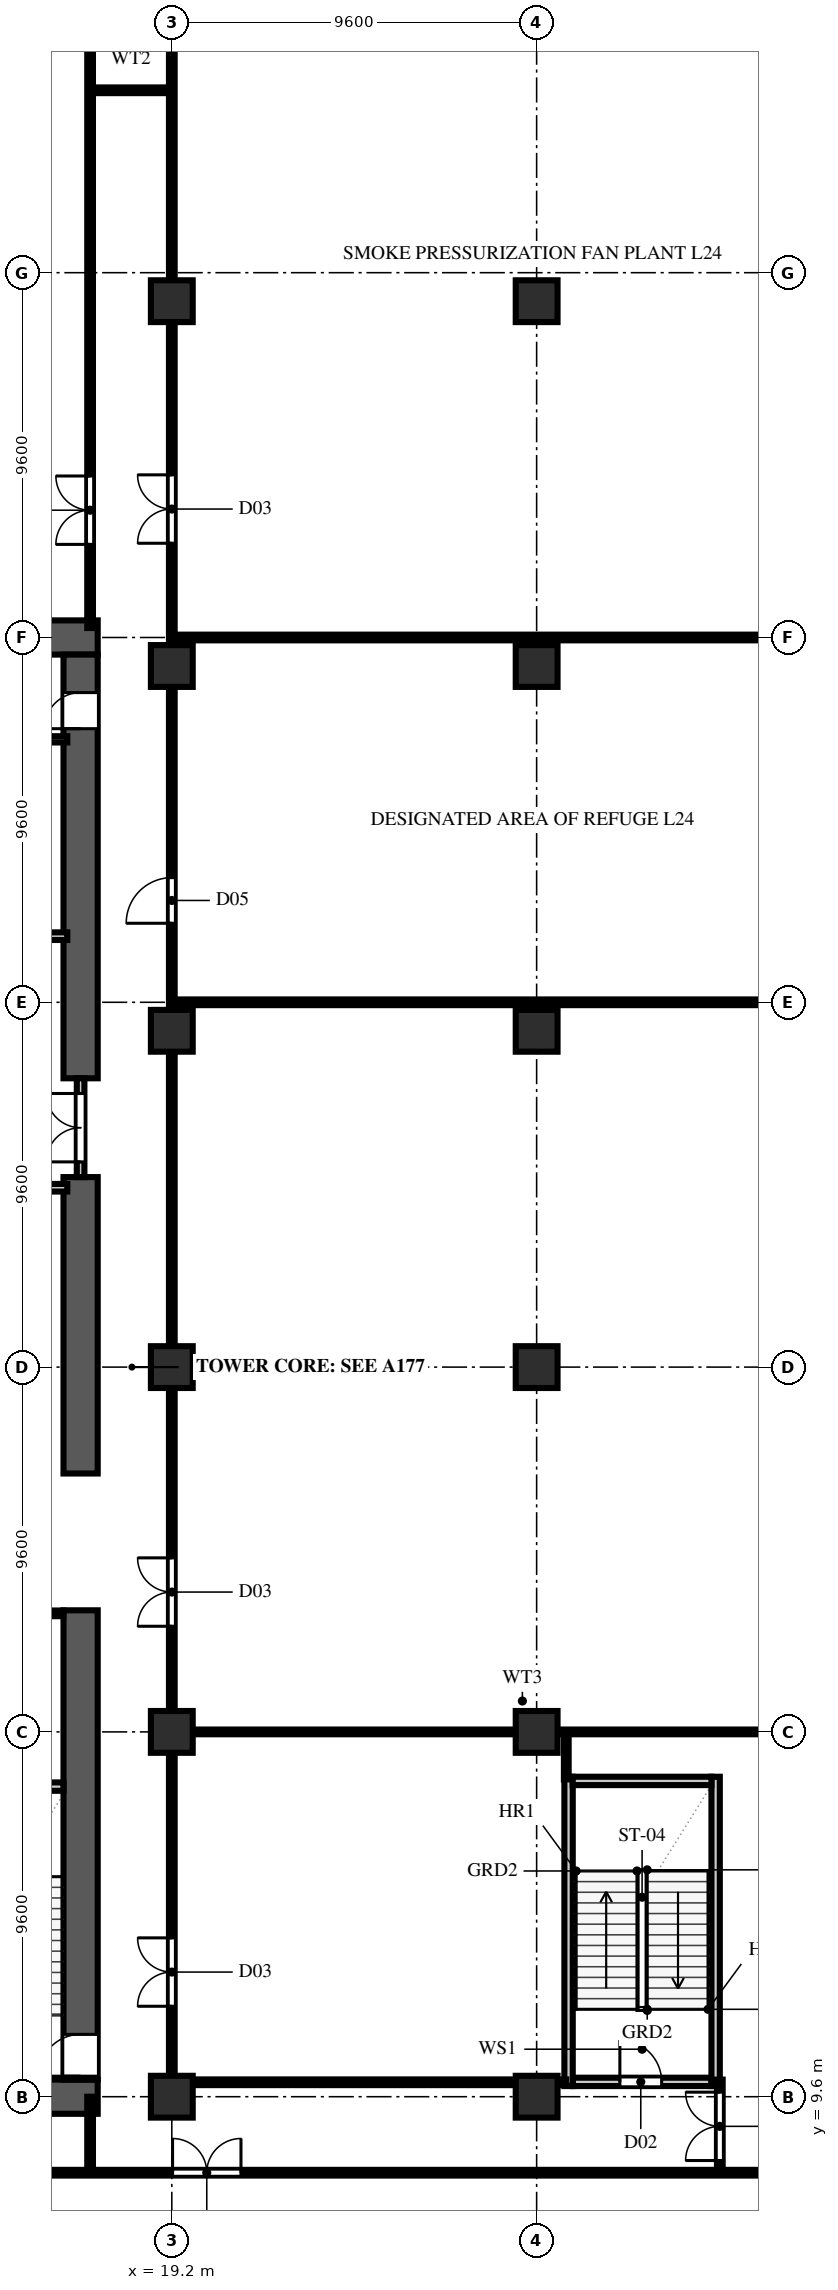
"""IFC4 building model, lengths in metres.
Left out: names, types, materials, properties, quantities, classifications, styles, units other than length and angle.
Written with IfcOpenShell. Run it as: python <this file> out.ifc"""

import sys

from ifc_helpers import new_model, si_unit, direction, frame, frame_2d, origin, origin_2d, place, context, subcontext, project, spatial, rectangle, extrude, element, fill, save


model = new_model("IFC4")
c1 = context("Model", 3, precision=1e-05, world=origin(), true_north=direction((0.0, 1.0)))
c2 = subcontext(c1, "Body", "Model", "MODEL_VIEW")
j1 = project(units=[si_unit("LENGTHUNIT", "METRE"), si_unit("PLANEANGLEUNIT", "RADIAN")], contexts=[c1])
p1 = place(None, origin())
s1 = spatial("IfcSite", under=j1, at=p1, CompositionType="ELEMENT")
p2 = place(p1, origin())
s2 = spatial("IfcBuilding", under=s1, at=p2, CompositionType="ELEMENT")
p3 = place(p2, frame((0.0, 0.0, 96.4)))
s3 = spatial("IfcBuildingStorey", under=s2, at=p3, CompositionType="ELEMENT", Elevation=96.4)
for number, where, z_axis, x_axis in (
    (1, (2.65, 9.6, 0.0), (0.0, 0.0, 1.0), (1.0, 0.0, 0.0)),
    (2, (2.65, 48.0, 0.0), (0.0, 0.0, 1.0), (1.0, 0.0, 0.0)),
):
    element("IfcWall", number, at=place(p3, frame(where, z_axis=z_axis, x_axis=x_axis)), inside=s3, PredefinedType="SHEAR", context=c2, shape_type="SweptSolid", body=[
        extrude(rectangle(XDim=14.6, YDim=0.9, at=frame_2d((7.3, 0.0))), origin(), (0.0, 0.0, 1.0), 4.74),
    ])
p4 = place(p3, frame((16.8, 10.05, 0.0), z_axis=(0.0, 0.0, 1.0), x_axis=(0.0, 1.0, 0.0)))
e3 = element("IfcWall", 3, at=p4, inside=s3, PredefinedType="SHEAR", context=c2, shape_type="SweptSolid", body=[
    extrude(rectangle(XDim=12.35, YDim=0.9, at=frame_2d((6.175, 0.0))), origin(), (0.0, 0.0, 1.0), 4.74),
])
p5 = place(p4, frame((0.09, 0.0, 0.0)))
e4 = element("IfcOpeningElement", 4, at=p5, cuts=e3, PredefinedType="OPENING", context=c2, shape_type="SweptSolid", body=[
    extrude(rectangle(XDim=1.1, YDim=2.2, at=frame_2d((0.55, 1.1))), frame((0.0, 0.462, 0.0), z_axis=(0.0, -1.0, 0.0), x_axis=(1.0, 0.0, 0.0)), (0.0, 0.0, 1.0), 0.924),
])
p6 = place(p3, frame((16.8, 26.0, 0.0), z_axis=(0.0, 0.0, 1.0), x_axis=(0.0, 1.0, 0.0)))
e5 = element("IfcWall", 5, at=p6, inside=s3, PredefinedType="SHEAR", context=c2, shape_type="SweptSolid", body=[
    extrude(rectangle(XDim=7.8, YDim=0.9, at=frame_2d((3.9, 0.0))), origin(), (0.0, 0.0, 1.0), 4.74),
])
p7 = place(p3, frame((16.8, 36.4, 0.0), z_axis=(0.0, 0.0, 1.0), x_axis=(0.0, 1.0, 0.0)))
e6 = element("IfcWall", 6, at=p7, inside=s3, PredefinedType="SHEAR", context=c2, shape_type="SweptSolid", body=[
    extrude(rectangle(XDim=11.15, YDim=0.9, at=frame_2d((5.575, 0.0))), origin(), (0.0, 0.0, 1.0), 4.74),
])
p8 = place(p7, frame((9.2, 0.0, 0.0)))
e7 = element("IfcOpeningElement", 7, at=p8, cuts=e6, PredefinedType="OPENING", context=c2, shape_type="SweptSolid", body=[
    extrude(rectangle(XDim=0.95, YDim=2.15, at=frame_2d((0.475, 1.075))), frame((0.0, 0.462, 0.0), z_axis=(0.0, -1.0, 0.0), x_axis=(1.0, 0.0, 0.0)), (0.0, 0.0, 1.0), 0.924),
])
for number, where, z_axis, x_axis in (
    (8, (19.2, 9.6, 0.0), (0.0, 0.0, 1.0), (1.0, 0.0, 0.0)),
    (9, (19.2, 19.2, 0.0), (0.0, 0.0, 1.0), (1.0, 0.0, 0.0)),
    (10, (19.2, 28.8, 0.0), (0.0, 0.0, 1.0), (1.0, 0.0, 0.0)),
    (11, (19.2, 37.65, 0.0), (0.0, 0.0, 1.0), (1.0, 0.0, 0.0)),
    (12, (19.2, 47.25, 0.0), (0.0, 0.0, 1.0), (1.0, 0.0, 0.0)),
    (13, (19.2, 56.85, 0.0), (0.0, 0.0, 1.0), (1.0, 0.0, 0.0)),
    (14, (28.8, 9.6, 0.0), (0.0, 0.0, 1.0), (1.0, 0.0, 0.0)),
    (15, (28.8, 19.2, 0.0), (0.0, 0.0, 1.0), (1.0, 0.0, 0.0)),
    (16, (28.8, 28.8, 0.0), (0.0, 0.0, 1.0), (1.0, 0.0, 0.0)),
    (17, (28.8, 37.65, 0.0), (0.0, 0.0, 1.0), (1.0, 0.0, 0.0)),
    (18, (28.8, 47.25, 0.0), (0.0, 0.0, 1.0), (1.0, 0.0, 0.0)),
    (19, (28.8, 56.85, 0.0), (0.0, 0.0, 1.0), (1.0, 0.0, 0.0)),
):
    element("IfcColumn", number, at=place(p3, frame(where, z_axis=z_axis, x_axis=x_axis)), inside=s3, PredefinedType="COLUMN", context=c2, shape_type="SweptSolid", body=[
        extrude(rectangle(XDim=1.1, YDim=1.1, at=origin_2d()), origin(), (0.0, 0.0, 1.0), 5.0),
    ])
p9 = place(p3, frame((12.75, 17.76, 0.0), z_axis=(0.0, 0.0, 1.0), x_axis=(1.0, 0.0, 0.0)))
e20 = element("IfcWall", 20, at=p9, inside=s3, PredefinedType="SOLIDWALL", context=c2, shape_type="SweptSolid", body=[
    extrude(rectangle(XDim=3.6, YDim=0.22, at=frame_2d((1.8, 0.0))), origin(), (0.0, 0.0, 1.0), 4.74),
])
p10 = place(p3, frame((29.75, 9.99, 0.0), z_axis=(0.0, 0.0, 1.0), x_axis=(1.0, 0.0, 0.0)))
e21 = element("IfcWall", 21, at=p10, inside=s3, PredefinedType="SOLIDWALL", context=c2, shape_type="SweptSolid", body=[
    extrude(rectangle(XDim=3.65, YDim=0.22, at=frame_2d((1.825, 0.0))), origin(), (0.0, 0.0, 1.0), 4.74),
])
p11 = place(p10, frame((1.24, 0.0, 0.0)))
e22 = element("IfcOpeningElement", 22, at=p11, cuts=e21, PredefinedType="OPENING", context=c2, shape_type="SweptSolid", body=[
    extrude(rectangle(XDim=1.1, YDim=2.2, at=frame_2d((0.55, 1.1))), frame((0.0, 0.122, 0.0), z_axis=(0.0, -1.0, 0.0), x_axis=(1.0, 0.0, 0.0)), (0.0, 0.0, 1.0), 0.244),
])
for number, where, z_axis, x_axis in (
    (23, (29.64, 9.88, 0.0), (0.0, 0.0, 1.0), (0.0, 1.0, 0.0)),
    (24, (33.51, 9.88, 0.0), (0.0, 0.0, 1.0), (0.0, 1.0, 0.0)),
):
    element("IfcWall", number, at=place(p3, frame(where, z_axis=z_axis, x_axis=x_axis)), inside=s3, PredefinedType="SOLIDWALL", context=c2, shape_type="SweptSolid", body=[
        extrude(rectangle(XDim=8.14, YDim=0.22, at=frame_2d((4.07, 0.0))), origin(), (0.0, 0.0, 1.0), 4.74),
    ])
p12 = place(p3, frame((29.75, 17.91, 0.0), z_axis=(0.0, 0.0, 1.0), x_axis=(1.0, 0.0, 0.0)))
e25 = element("IfcWall", 25, at=p12, inside=s3, PredefinedType="SOLIDWALL", context=c2, shape_type="SweptSolid", body=[
    extrude(rectangle(XDim=3.65, YDim=0.22, at=frame_2d((1.825, 0.0))), origin(), (0.0, 0.0, 1.0), 4.74),
])
p13 = place(p3, frame((13.12, 33.52, 0.0), z_axis=(0.0, 0.0, 1.0), x_axis=(1.0, 0.0, 0.0)))
e26 = element("IfcWall", 26, at=p13, inside=s3, PredefinedType="SOLIDWALL", context=c2, shape_type="SweptSolid", body=[
    extrude(rectangle(XDim=3.33, YDim=0.2, at=frame_2d((1.665, 0.0))), origin(), (0.0, 0.0, 1.0), 4.74),
])
p14 = place(p3, frame((6.32, 40.14, 0.0), z_axis=(0.0, 0.0, 1.0), x_axis=(1.0, 0.0, 0.0)))
e27 = element("IfcWall", 27, at=p14, inside=s3, PredefinedType="SOLIDWALL", context=c2, shape_type="SweptSolid", body=[
    extrude(rectangle(XDim=10.13, YDim=0.2, at=frame_2d((5.065, 0.0))), origin(), (0.0, 0.0, 1.0), 4.74),
])
p15 = place(p3, frame((16.8, 33.8, 0.0), z_axis=(0.0, 0.0, 1.0), x_axis=(0.0, 1.0, 0.0)))
e28 = element("IfcWall", 28, at=p15, inside=s3, PredefinedType="SOLIDWALL", context=c2, shape_type="SweptSolid", body=[
    extrude(rectangle(XDim=2.6, YDim=0.2, at=frame_2d((1.3, 0.0))), origin(), (0.0, 0.0, 1.0), 4.74),
])
p16 = place(p15, frame((0.4, 0.0, 0.0)))
e29 = element("IfcOpeningElement", 29, at=p16, cuts=e28, PredefinedType="OPENING", context=c2, shape_type="SweptSolid", body=[
    extrude(rectangle(XDim=1.8, YDim=2.2, at=frame_2d((0.9, 1.1))), frame((0.0, 0.112, 0.0), z_axis=(0.0, -1.0, 0.0), x_axis=(1.0, 0.0, 0.0)), (0.0, 0.0, 1.0), 0.224),
])
p17 = place(p3, frame((13.225, 22.32, 0.0), z_axis=(0.0, 0.0, 1.0), x_axis=(1.0, 0.0, 0.0)))
e30 = element("IfcWall", 30, at=p17, inside=s3, PredefinedType="PARTITIONING", context=c2, shape_type="SweptSolid", body=[
    extrude(rectangle(XDim=3.12, YDim=0.15, at=frame_2d((1.56, 0.0))), origin(), (0.0, 0.0, 1.0), 4.74),
])
p18 = place(p17, frame((1.0, 0.0, 0.0)))
e31 = element("IfcOpeningElement", 31, at=p18, cuts=e30, PredefinedType="OPENING", context=c2, shape_type="SweptSolid", body=[
    extrude(rectangle(XDim=0.85, YDim=2.1, at=frame_2d((0.425, 1.05))), frame((0.0, 0.087, 0.0), z_axis=(0.0, -1.0, 0.0), x_axis=(1.0, 0.0, 0.0)), (0.0, 0.0, 1.0), 0.174),
])
p19 = place(p3, frame((6.32, 45.32, 0.0), z_axis=(0.0, 0.0, 1.0), x_axis=(1.0, 0.0, 0.0)))
e32 = element("IfcWall", 32, at=p19, inside=s3, PredefinedType="PLUMBINGWALL", context=c2, shape_type="SweptSolid", body=[
    extrude(rectangle(XDim=10.13, YDim=0.165, at=frame_2d((5.065, 0.0))), origin(), (0.0, 0.0, 1.0), 4.74),
])
p20 = place(p19, frame((0.9, 0.0, 0.0)))
e33 = element("IfcOpeningElement", 33, at=p20, cuts=e32, PredefinedType="OPENING", context=c2, shape_type="SweptSolid", body=[
    extrude(rectangle(XDim=0.92, YDim=2.15, at=frame_2d((0.46, 1.075))), frame((0.0, 0.094, 0.0), z_axis=(0.0, -1.0, 0.0), x_axis=(1.0, 0.0, 0.0)), (0.0, 0.0, 1.0), 0.189),
])
p21 = place(p19, frame((4.6, 0.0, 0.0)))
e34 = element("IfcOpeningElement", 34, at=p21, cuts=e32, PredefinedType="OPENING", context=c2, shape_type="SweptSolid", body=[
    extrude(rectangle(XDim=0.92, YDim=2.15, at=frame_2d((0.46, 1.075))), frame((0.0, 0.094, 0.0), z_axis=(0.0, -1.0, 0.0), x_axis=(1.0, 0.0, 0.0)), (0.0, 0.0, 1.0), 0.189),
])
p22 = place(p19, frame((8.1, 0.0, 0.0)))
e35 = element("IfcOpeningElement", 35, at=p22, cuts=e32, PredefinedType="OPENING", context=c2, shape_type="SweptSolid", body=[
    extrude(rectangle(XDim=0.92, YDim=2.15, at=frame_2d((0.46, 1.075))), frame((0.0, 0.094, 0.0), z_axis=(0.0, -1.0, 0.0), x_axis=(1.0, 0.0, 0.0)), (0.0, 0.0, 1.0), 0.189),
])
p23 = place(p3, frame((17.05, 7.6, 0.0), z_axis=(0.0, 0.0, 1.0), x_axis=(0.0, 1.0, 0.0)))
e36 = element("IfcWall", 36, at=p23, inside=s3, PredefinedType="PARTITIONING", context=c2, shape_type="SweptSolid", body=[
    extrude(rectangle(XDim=2.0, YDim=0.15, at=frame_2d((1.0, 0.0))), origin(), (0.0, 0.0, 1.0), 4.74),
])
p24 = place(p3, frame((17.05, 62.4, 0.0), z_axis=(0.0, 0.0, 1.0), x_axis=(1.0, 0.0, 0.0)))
e37 = element("IfcWall", 37, at=p24, inside=s3, PredefinedType="PARTITIONING", context=c2, shape_type="SweptSolid", body=[
    extrude(rectangle(XDim=2.15, YDim=0.15, at=frame_2d((1.075, 0.0))), origin(), (0.0, 0.0, 1.0), 4.74),
])
p25 = place(p3, frame((0.22, 7.6, 0.0), z_axis=(0.0, 0.0, 1.0), x_axis=(1.0, 0.0, 0.0)))
e38 = element("IfcWall", 38, at=p25, inside=s3, PredefinedType="PARTITIONING", context=c2, shape_type="SweptSolid", body=[
    extrude(rectangle(XDim=66.76, YDim=0.15, at=frame_2d((33.38, 0.0))), origin(), (0.0, 0.0, 1.0), 4.74),
])
p26 = place(p25, frame((19.0, 0.0, 0.0)))
e39 = element("IfcOpeningElement", 39, at=p26, cuts=e38, PredefinedType="OPENING", context=c2, shape_type="SweptSolid", body=[
    extrude(rectangle(XDim=1.8, YDim=2.2, at=frame_2d((0.9, 1.1))), frame((0.0, 0.087, 0.0), z_axis=(0.0, -1.0, 0.0), x_axis=(1.0, 0.0, 0.0)), (0.0, 0.0, 1.0), 0.174),
])
p27 = place(p3, frame((33.62, 7.6, 0.0), z_axis=(0.0, 0.0, 1.0), x_axis=(0.0, 1.0, 0.0)))
e40 = element("IfcWall", 40, at=p27, inside=s3, PredefinedType="PARTITIONING", context=c2, shape_type="SweptSolid", body=[
    extrude(rectangle(XDim=2.45, YDim=0.15, at=frame_2d((1.225, 0.0))), origin(), (0.0, 0.0, 1.0), 4.74),
])
p28 = place(p27, frame((0.32, 0.0, 0.0)))
e41 = element("IfcOpeningElement", 41, at=p28, cuts=e40, PredefinedType="OPENING", context=c2, shape_type="SweptSolid", body=[
    extrude(rectangle(XDim=1.8, YDim=2.2, at=frame_2d((0.9, 1.1))), frame((0.0, 0.087, 0.0), z_axis=(0.0, -1.0, 0.0), x_axis=(1.0, 0.0, 0.0)), (0.0, 0.0, 1.0), 0.174),
])
p29 = place(p3, frame((19.2, 9.98, 0.0), z_axis=(0.0, 0.0, 1.0), x_axis=(1.0, 0.0, 0.0)))
e42 = element("IfcWall", 42, at=p29, inside=s3, PredefinedType="PARTITIONING", context=c2, shape_type="SweptSolid", body=[
    extrude(rectangle(XDim=10.38, YDim=0.15, at=frame_2d((5.19, 0.0))), origin(), (0.0, 0.0, 1.0), 4.74),
])
p30 = place(p3, frame((29.58, 17.95, 0.0), z_axis=(0.0, 0.0, 1.0), x_axis=(0.0, 1.0, 0.0)))
e43 = element("IfcWall", 43, at=p30, inside=s3, PredefinedType="PARTITIONING", context=c2, shape_type="SweptSolid", body=[
    extrude(rectangle(XDim=1.25, YDim=0.125, at=frame_2d((0.625, 0.0))), origin(), (0.0, 0.0, 1.0), 4.74),
])
p31 = place(p3, frame((19.2, 19.2, 0.0), z_axis=(0.0, 0.0, 1.0), x_axis=(1.0, 0.0, 0.0)))
e44 = element("IfcWall", 44, at=p31, inside=s3, PredefinedType="PARTITIONING", context=c2, shape_type="SweptSolid", body=[
    extrude(rectangle(XDim=18.45, YDim=0.125, at=frame_2d((9.225, 0.0))), origin(), (0.0, 0.0, 1.0), 2.323),
])
for number, where, z_axis, x_axis in (
    (45, (19.2, 38.4, 0.0), (0.0, 0.0, 1.0), (1.0, 0.0, 0.0)),
    (46, (19.2, 48.0, 0.0), (0.0, 0.0, 1.0), (1.0, 0.0, 0.0)),
):
    element("IfcWall", number, at=place(p3, frame(where, z_axis=z_axis, x_axis=x_axis)), inside=s3, PredefinedType="PARTITIONING", context=c2, shape_type="SweptSolid", body=[
        extrude(rectangle(XDim=18.98, YDim=0.15, at=frame_2d((9.49, 0.0))), origin(), (0.0, 0.0, 1.0), 4.74),
    ])
p32 = place(p3, frame((19.2, 9.98, 0.0), z_axis=(0.0, 0.0, 1.0), x_axis=(0.0, 1.0, 0.0)))
e47 = element("IfcWall", 47, at=p32, inside=s3, PredefinedType="PARTITIONING", context=c2, shape_type="SweptSolid", body=[
    extrude(rectangle(XDim=56.47, YDim=0.15, at=frame_2d((28.235, 0.0))), origin(), (0.0, 0.0, 1.0), 3.967),
])
p33 = place(p32, frame((2.0, 0.0, 0.0)))
e48 = element("IfcOpeningElement", 48, at=p33, cuts=e47, PredefinedType="OPENING", context=c2, shape_type="SweptSolid", body=[
    extrude(rectangle(XDim=1.8, YDim=2.2, at=frame_2d((0.9, 1.1))), frame((0.0, 0.087, 0.0), z_axis=(0.0, -1.0, 0.0), x_axis=(1.0, 0.0, 0.0)), (0.0, 0.0, 1.0), 0.174),
])
p34 = place(p32, frame((12.0, 0.0, 0.0)))
e49 = element("IfcOpeningElement", 49, at=p34, cuts=e47, PredefinedType="OPENING", context=c2, shape_type="SweptSolid", body=[
    extrude(rectangle(XDim=1.8, YDim=2.2, at=frame_2d((0.9, 1.1))), frame((0.0, 0.087, 0.0), z_axis=(0.0, -1.0, 0.0), x_axis=(1.0, 0.0, 0.0)), (0.0, 0.0, 1.0), 0.174),
])
p35 = place(p32, frame((30.5, 0.0, 0.0)))
e50 = element("IfcOpeningElement", 50, at=p35, cuts=e47, PredefinedType="OPENING", context=c2, shape_type="SweptSolid", body=[
    extrude(rectangle(XDim=1.2, YDim=2.2, at=frame_2d((0.6, 1.1))), frame((0.0, 0.087, 0.0), z_axis=(0.0, -1.0, 0.0), x_axis=(1.0, 0.0, 0.0)), (0.0, 0.0, 1.0), 0.174),
])
p36 = place(p32, frame((40.5, 0.0, 0.0)))
e51 = element("IfcOpeningElement", 51, at=p36, cuts=e47, PredefinedType="OPENING", context=c2, shape_type="SweptSolid", body=[
    extrude(rectangle(XDim=1.8, YDim=2.2, at=frame_2d((0.9, 1.1))), frame((0.0, 0.087, 0.0), z_axis=(0.0, -1.0, 0.0), x_axis=(1.0, 0.0, 0.0)), (0.0, 0.0, 1.0), 0.174),
])
p37 = place(p3, frame((17.05, 48.25, 0.0), z_axis=(0.0, 0.0, 1.0), x_axis=(0.0, 1.0, 0.0)))
e52 = element("IfcWall", 52, at=p37, inside=s3, PredefinedType="PARTITIONING", context=c2, shape_type="SweptSolid", body=[
    extrude(rectangle(XDim=18.73, YDim=0.15, at=frame_2d((9.365, 0.0))), origin(), (0.0, 0.0, 1.0), 4.74),
])
p38 = place(p37, frame((2.2, 0.0, 0.0)))
e53 = element("IfcOpeningElement", 53, at=p38, cuts=e52, PredefinedType="OPENING", context=c2, shape_type="SweptSolid", body=[
    extrude(rectangle(XDim=1.8, YDim=2.2, at=frame_2d((0.9, 1.1))), frame((0.0, 0.087, 0.0), z_axis=(0.0, -1.0, 0.0), x_axis=(1.0, 0.0, 0.0)), (0.0, 0.0, 1.0), 0.174),
])
p39 = place(p5, origin())
e54 = element("IfcDoor", 54, at=p39, inside=s3, OperationType="SINGLE_SWING_LEFT", PredefinedType="DOOR", context=c2, shape_type="SweptSolid", body=[
    extrude(rectangle(XDim=1.1, YDim=2.2, at=frame_2d((0.55, 1.1))), frame((0.0, 0.025, 0.0), z_axis=(0.0, -1.0, 0.0), x_axis=(1.0, 0.0, 0.0)), (0.0, 0.0, 1.0), 0.05),
])
fill(e4, e54)
p40 = place(p11, origin())
e55 = element("IfcDoor", 55, at=p40, inside=s3, OperationType="SINGLE_SWING_LEFT", PredefinedType="DOOR", context=c2, shape_type="SweptSolid", body=[
    extrude(rectangle(XDim=1.1, YDim=2.2, at=frame_2d((0.55, 1.1))), frame((0.0, 0.025, 0.0), z_axis=(0.0, -1.0, 0.0), x_axis=(1.0, 0.0, 0.0)), (0.0, 0.0, 1.0), 0.05),
])
fill(e22, e55)
p41 = place(p8, origin())
e56 = element("IfcDoor", 56, at=p41, inside=s3, OperationType="SINGLE_SWING_LEFT", PredefinedType="DOOR", context=c2, shape_type="SweptSolid", body=[
    extrude(rectangle(XDim=0.95, YDim=2.15, at=frame_2d((0.475, 1.075))), frame((0.0, 0.025, 0.0), z_axis=(0.0, -1.0, 0.0), x_axis=(1.0, 0.0, 0.0)), (0.0, 0.0, 1.0), 0.05),
])
fill(e7, e56)
p42 = place(p16, origin())
e57 = element("IfcDoor", 57, at=p42, inside=s3, OperationType="DOUBLE_DOOR_SINGLE_SWING", PredefinedType="DOOR", context=c2, shape_type="SweptSolid", body=[
    extrude(rectangle(XDim=1.8, YDim=2.2, at=frame_2d((0.9, 1.1))), frame((0.0, 0.025, 0.0), z_axis=(0.0, -1.0, 0.0), x_axis=(1.0, 0.0, 0.0)), (0.0, 0.0, 1.0), 0.05),
])
fill(e29, e57)
p43 = place(p26, origin())
e58 = element("IfcDoor", 58, at=p43, inside=s3, OperationType="DOUBLE_DOOR_SINGLE_SWING", PredefinedType="DOOR", context=c2, shape_type="SweptSolid", body=[
    extrude(rectangle(XDim=1.8, YDim=2.2, at=frame_2d((0.9, 1.1))), frame((0.0, 0.025, 0.0), z_axis=(0.0, -1.0, 0.0), x_axis=(1.0, 0.0, 0.0)), (0.0, 0.0, 1.0), 0.05),
])
fill(e39, e58)
p44 = place(p28, origin())
e59 = element("IfcDoor", 59, at=p44, inside=s3, OperationType="DOUBLE_DOOR_SINGLE_SWING", PredefinedType="DOOR", context=c2, shape_type="SweptSolid", body=[
    extrude(rectangle(XDim=1.8, YDim=2.2, at=frame_2d((0.9, 1.1))), frame((0.0, 0.025, 0.0), z_axis=(0.0, -1.0, 0.0), x_axis=(1.0, 0.0, 0.0)), (0.0, 0.0, 1.0), 0.05),
])
fill(e41, e59)
p45 = place(p33, origin())
e60 = element("IfcDoor", 60, at=p45, inside=s3, OperationType="DOUBLE_DOOR_SINGLE_SWING", PredefinedType="DOOR", context=c2, shape_type="SweptSolid", body=[
    extrude(rectangle(XDim=1.8, YDim=2.2, at=frame_2d((0.9, 1.1))), frame((0.0, 0.025, 0.0), z_axis=(0.0, -1.0, 0.0), x_axis=(1.0, 0.0, 0.0)), (0.0, 0.0, 1.0), 0.05),
])
fill(e48, e60)
p46 = place(p34, origin())
e61 = element("IfcDoor", 61, at=p46, inside=s3, OperationType="DOUBLE_DOOR_SINGLE_SWING", PredefinedType="DOOR", context=c2, shape_type="SweptSolid", body=[
    extrude(rectangle(XDim=1.8, YDim=2.2, at=frame_2d((0.9, 1.1))), frame((0.0, 0.025, 0.0), z_axis=(0.0, -1.0, 0.0), x_axis=(1.0, 0.0, 0.0)), (0.0, 0.0, 1.0), 0.05),
])
fill(e49, e61)
p47 = place(p35, origin())
e62 = element("IfcDoor", 62, at=p47, inside=s3, OperationType="SINGLE_SWING_LEFT", PredefinedType="DOOR", context=c2, shape_type="SweptSolid", body=[
    extrude(rectangle(XDim=1.2, YDim=2.2, at=frame_2d((0.6, 1.1))), frame((0.0, 0.025, 0.0), z_axis=(0.0, -1.0, 0.0), x_axis=(1.0, 0.0, 0.0)), (0.0, 0.0, 1.0), 0.05),
])
fill(e50, e62)
p48 = place(p36, origin())
e63 = element("IfcDoor", 63, at=p48, inside=s3, OperationType="DOUBLE_DOOR_SINGLE_SWING", PredefinedType="DOOR", context=c2, shape_type="SweptSolid", body=[
    extrude(rectangle(XDim=1.8, YDim=2.2, at=frame_2d((0.9, 1.1))), frame((0.0, 0.025, 0.0), z_axis=(0.0, -1.0, 0.0), x_axis=(1.0, 0.0, 0.0)), (0.0, 0.0, 1.0), 0.05),
])
fill(e51, e63)
p49 = place(p38, origin())
e64 = element("IfcDoor", 64, at=p49, inside=s3, OperationType="DOUBLE_DOOR_SINGLE_SWING", PredefinedType="DOOR", context=c2, shape_type="SweptSolid", body=[
    extrude(rectangle(XDim=1.8, YDim=2.2, at=frame_2d((0.9, 1.1))), frame((0.0, 0.025, 0.0), z_axis=(0.0, -1.0, 0.0), x_axis=(1.0, 0.0, 0.0)), (0.0, 0.0, 1.0), 0.05),
])
fill(e53, e64)
save(model, sys.argv[1])
